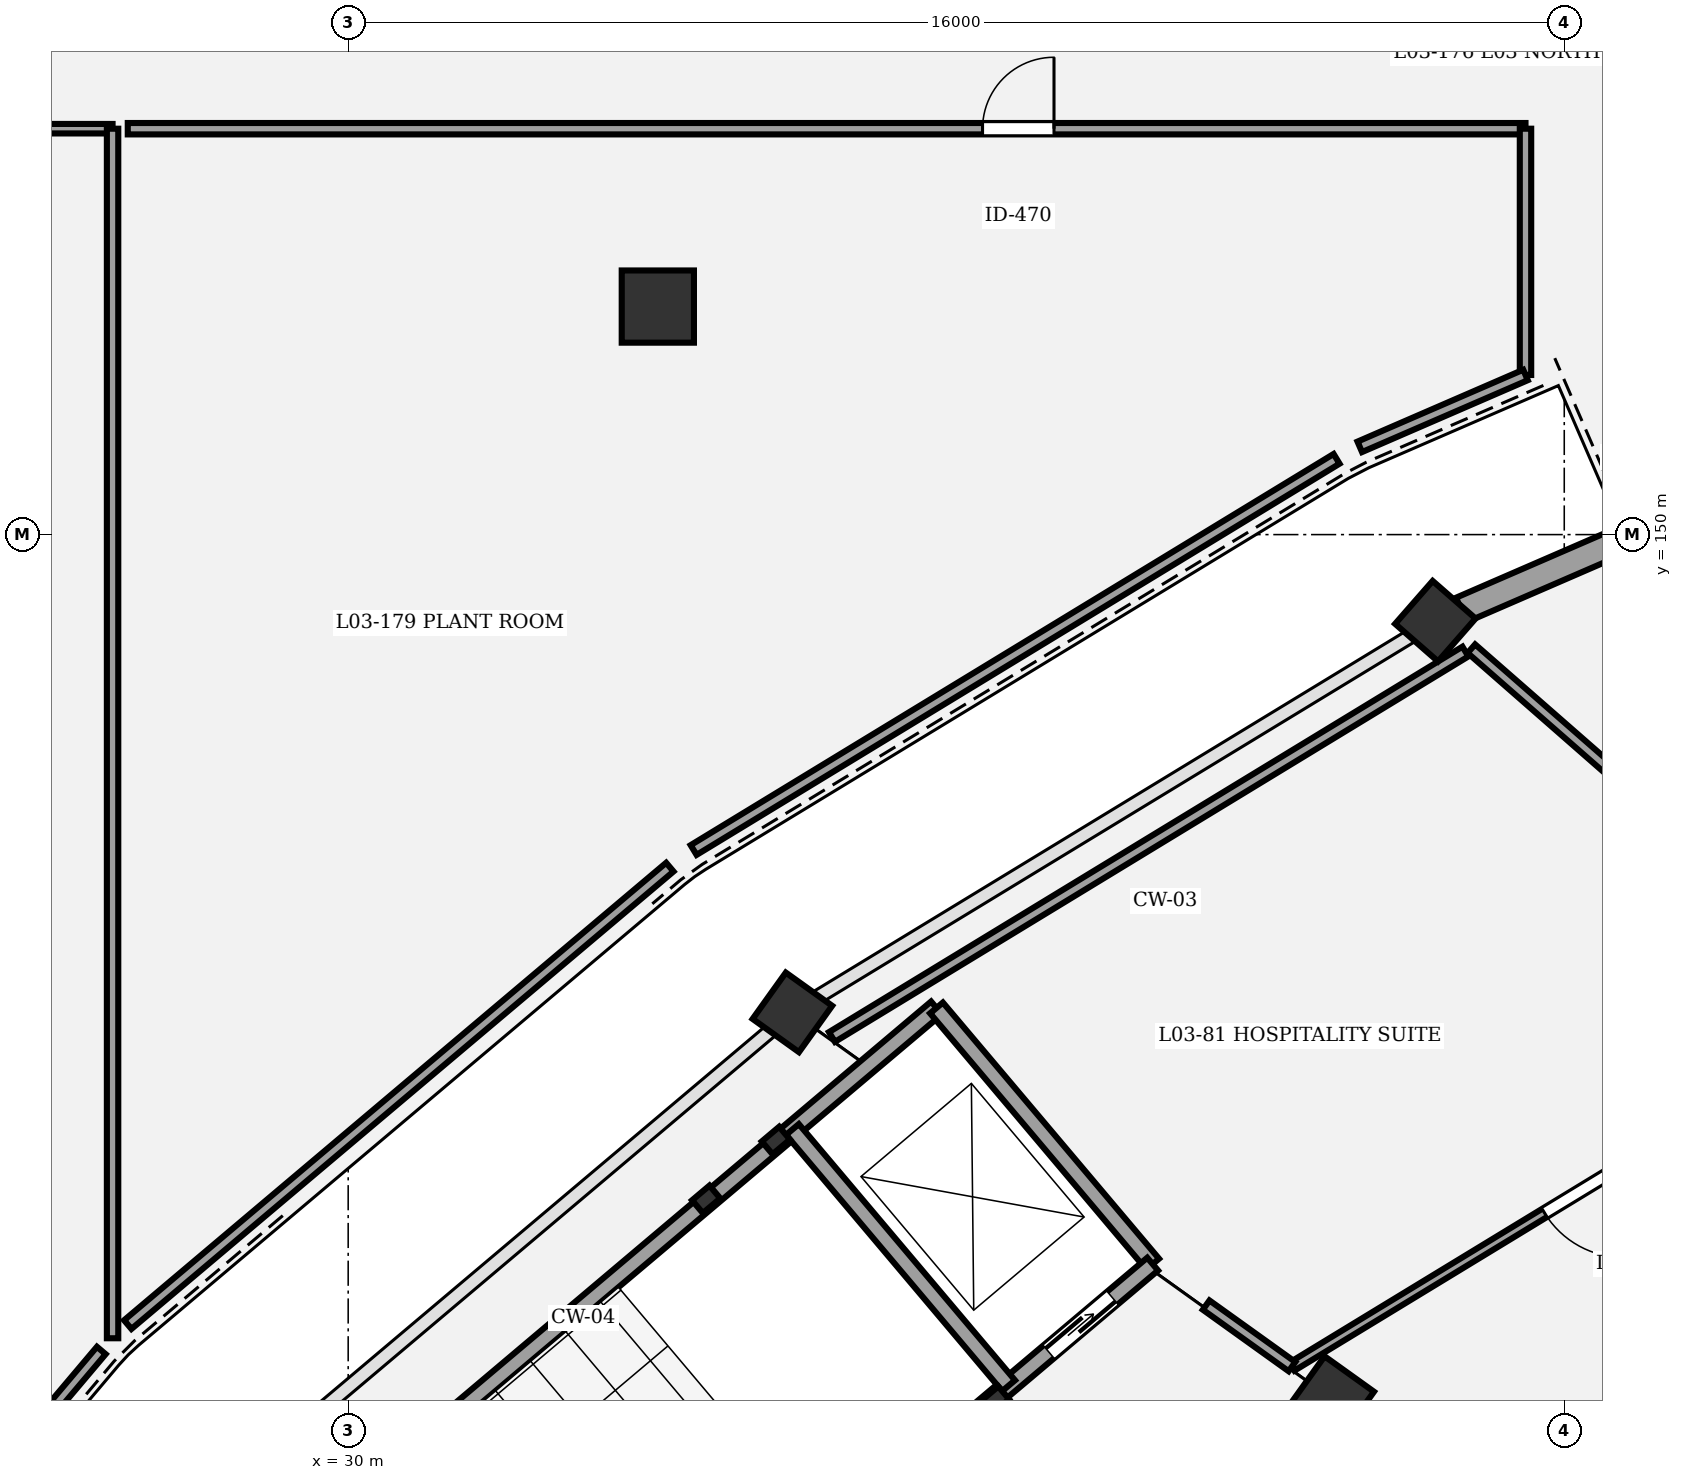
"""IFC4 building model, lengths in metres.
Left out: names, types, materials, properties, quantities, classifications, styles, units other than length and angle.
Written with IfcOpenShell. Run it as: python <this file> out.ifc"""

import sys

from ifc_helpers import new_model, si_unit, direction, frame, frame_2d, origin, origin_2d, place, context, subcontext, project, spatial, rectangle, circle, extrude, element, fill, save


model = new_model("IFC4")
c1 = context("Model", 3, precision=1e-05, world=origin(), true_north=direction((0.0, 1.0)))
c2 = subcontext(c1, "Body", "Model", "MODEL_VIEW")
j1 = project(units=[si_unit("LENGTHUNIT", "METRE"), si_unit("PLANEANGLEUNIT", "RADIAN")], contexts=[c1])
p1 = place(None, origin())
s1 = spatial("IfcSite", under=j1, at=p1, CompositionType="ELEMENT")
p2 = place(p1, origin())
s2 = spatial("IfcBuilding", under=s1, at=p2, CompositionType="ELEMENT")
p3 = place(p2, frame((0.0, 0.0, 14.7)))
s3 = spatial("IfcBuildingStorey", under=s2, at=p3, CompositionType="ELEMENT", Elevation=14.7)
p4 = place(p3, frame((44.304, 148.861, 0.0), z_axis=(0.0, 0.0, 1.0), x_axis=(-0.752529860433, 0.658558128912, 0.0)))
e1 = element("IfcColumn", 1, at=p4, inside=s3, PredefinedType="COLUMN", context=c2, shape_type="SweptSolid", body=[
    extrude(rectangle(XDim=0.75, YDim=0.75, at=origin_2d()), origin(), (0.0, 0.0, 1.0), 4.5),
])
p5 = place(p3, frame((42.939, 138.632, 0.0), z_axis=(0.0, 0.0, 1.0), x_axis=(-0.812897512265, 0.582406760395, 0.0)))
e2 = element("IfcColumn", 2, at=p5, inside=s3, PredefinedType="COLUMN", context=c2, shape_type="SweptSolid", body=[
    extrude(rectangle(XDim=0.8, YDim=0.8, at=origin_2d()), origin(), (0.0, 0.0, 1.0), 4.5),
])
p6 = place(p3, frame((35.844, 143.715, 0.0), z_axis=(0.0, 0.0, 1.0), x_axis=(-0.812897512265, 0.582406760395, 0.0)))
e3 = element("IfcColumn", 3, at=p6, inside=s3, PredefinedType="COLUMN", context=c2, shape_type="SweptSolid", body=[
    extrude(rectangle(XDim=0.75, YDim=0.75, at=origin_2d()), origin(), (0.0, 0.0, 1.0), 4.5),
])
p7 = place(p3, frame((34.074, 153.0, 0.0), z_axis=(0.0, 0.0, 1.0), x_axis=(1.0, 0.0, 0.0)))
e4 = element("IfcColumn", 4, at=p7, inside=s3, PredefinedType="COLUMN", context=c2, shape_type="SweptSolid", body=[
    extrude(circle(Radius=0.475, at=origin_2d()), origin(), (0.0, 0.0, 1.0), 4.5),
])
p8 = place(p3, frame((44.646, 149.009, 0.0), z_axis=(0.0, 0.0, 1.0), x_axis=(0.917502782842, 0.397729359587, 0.0)))
e5 = element("IfcWall", 5, at=p8, inside=s3, PredefinedType="STANDARD", context=c2, shape_type="SweptSolid", body=[
    extrude(rectangle(XDim=9.89, YDim=0.35, at=frame_2d((4.945, 0.0))), origin(), (0.0, 0.0, 1.0), 3.42),
])
p9 = place(p8, frame((4.045, 0.0, 0.0)))
e6 = element("IfcOpeningElement", 6, at=p9, cuts=e5, PredefinedType="OPENING", context=c2, shape_type="SweptSolid", body=[
    extrude(rectangle(XDim=1.8, YDim=2.4, at=frame_2d((0.9, 1.2))), frame((0.0, 0.185, 0.0), z_axis=(0.0, -1.0, 0.0), x_axis=(1.0, 0.0, 0.0)), (0.0, 0.0, 1.0), 0.37),
])
for number, where, z_axis, x_axis in (
    (7, (38.51, 138.613, 0.0), (0.0, 0.0, 1.0), (0.764, 0.645, 0.0)),
    (8, (35.627, 142.029, 0.0), (0.0, 0.0, 1.0), (0.764, 0.645, 0.0)),
    (9, (34.71, 141.255, 0.0), (0.0, 0.0, 1.0), (0.764, 0.645, 0.0)),
):
    element("IfcColumn", number, at=place(p3, frame(where, z_axis=z_axis, x_axis=x_axis)), inside=s3, PredefinedType="COLUMN", context=c2, shape_type="SweptSolid", body=[
        extrude(rectangle(XDim=0.3, YDim=0.22, at=origin_2d()), origin(), (0.0, 0.0, 1.0), 4.5),
    ])
p10 = place(p3, frame((29.319, 136.666, 0.0), z_axis=(0.0, 0.0, 1.0), x_axis=(0.764247804305, 0.644922703598, 0.0)))
e10 = element("IfcWall", 10, at=p10, inside=s3, PredefinedType="SHEAR", context=c2, shape_type="SweptSolid", body=[
    extrude(rectangle(XDim=11.02, YDim=0.22, at=frame_2d((5.51, 0.0))), origin(), (0.0, 0.0, 1.0), 4.25),
])
p11 = place(p3, frame((40.585, 140.403, 0.0), z_axis=(0.0, 0.0, 1.0), x_axis=(-0.644936622785, 0.764236058159, 0.0)))
e11 = element("IfcWall", 11, at=p11, inside=s3, PredefinedType="SHEAR", context=c2, shape_type="SweptSolid", body=[
    extrude(rectangle(XDim=4.41, YDim=0.22, at=frame_2d((2.205, 0.0))), origin(), (0.0, 0.0, 1.0), 4.25),
])
p12 = place(p3, frame((32.163, 133.296, 0.0), z_axis=(0.0, 0.0, 1.0), x_axis=(0.764257018762, 0.644911784102, 0.0)))
e12 = element("IfcWall", 12, at=p12, inside=s3, PredefinedType="SHEAR", context=c2, shape_type="SweptSolid", body=[
    extrude(rectangle(XDim=11.02, YDim=0.22, at=frame_2d((5.51, 0.0))), origin(), (0.0, 0.0, 1.0), 4.25),
])
p13 = place(p12, frame((0.3, 0.0, 0.0)))
e13 = element("IfcOpeningElement", 13, at=p13, cuts=e12, PredefinedType="OPENING", context=c2, shape_type="SweptSolid", body=[
    extrude(rectangle(XDim=1.15, YDim=2.15, at=frame_2d((0.575, 1.075))), frame((0.0, 0.12, 0.0), z_axis=(0.0, -1.0, 0.0), x_axis=(1.0, 0.0, 0.0)), (0.0, 0.0, 1.0), 0.24),
])
p14 = place(p12, frame((9.23, 0.0, 0.0)))
e14 = element("IfcOpeningElement", 14, at=p14, cuts=e12, PredefinedType="OPENING", context=c2, shape_type="SweptSolid", body=[
    extrude(rectangle(XDim=1.1, YDim=2.15, at=frame_2d((0.55, 1.075))), frame((0.0, 0.12, 0.0), z_axis=(0.0, -1.0, 0.0), x_axis=(1.0, 0.0, 0.0)), (0.0, 0.0, 1.0), 0.24),
])
p15 = place(p3, frame((38.689, 138.803, 0.0), z_axis=(0.0, 0.0, 1.0), x_axis=(-0.644904288042, 0.764263344185, 0.0)))
e15 = element("IfcWall", 15, at=p15, inside=s3, PredefinedType="SHEAR", context=c2, shape_type="SweptSolid", body=[
    extrude(rectangle(XDim=4.41, YDim=0.22, at=frame_2d((2.205, 0.0))), origin(), (0.0, 0.0, 1.0), 4.25),
])
p16 = place(p3, frame((50.105, 143.731, 0.0), z_axis=(0.0, 0.0, 1.0), x_axis=(-0.854321649351, -0.519744667554, 0.0)))
e16 = element("IfcWall", 16, at=p16, inside=s3, PredefinedType="PARTITIONING", context=c2, shape_type="SweptSolid", body=[
    extrude(rectangle(XDim=8.999, YDim=0.125, at=frame_2d((4.499, 0.0))), origin(), (0.0, 0.0, 1.0), 3.25),
])
p17 = place(p16, frame((3.889, 0.0, 0.0)))
e17 = element("IfcOpeningElement", 17, at=p17, cuts=e16, PredefinedType="OPENING", context=c2, shape_type="SweptSolid", body=[
    extrude(rectangle(XDim=1.22, YDim=2.2, at=frame_2d((0.61, 1.1))), frame((0.0, 0.073, 0.0), z_axis=(0.0, -1.0, 0.0), x_axis=(1.0, 0.0, 0.0)), (0.0, 0.0, 1.0), 0.145),
])
p18 = place(p3, frame((13.469, 155.343, 0.0), z_axis=(0.0, 0.0, 1.0), x_axis=(0.99999997621, -0.00021812629, 0.0)))
e18 = element("IfcWall", 18, at=p18, inside=s3, PredefinedType="PARTITIONING", context=c2, shape_type="SweptSolid", body=[
    extrude(rectangle(XDim=13.431, YDim=0.125, at=frame_2d((6.716, 0.0))), origin(), (0.0, 0.0, 1.0), 3.25),
])
p19 = place(p18, frame((7.724, 0.0, 0.0)))
e19 = element("IfcOpeningElement", 19, at=p19, cuts=e18, PredefinedType="OPENING", context=c2, shape_type="SweptSolid", body=[
    extrude(rectangle(XDim=1.4, YDim=2.3, at=frame_2d((0.7, 1.15))), frame((0.0, 0.073, 0.0), z_axis=(0.0, -1.0, 0.0), x_axis=(1.0, 0.0, 0.0)), (0.0, 0.0, 1.0), 0.145),
])
p20 = place(p3, frame((27.1, 155.34, 0.0), z_axis=(0.0, 0.0, 1.0), x_axis=(1.0, 0.0, 0.0)))
e20 = element("IfcWall", 20, at=p20, inside=s3, PredefinedType="PARTITIONING", context=c2, shape_type="SweptSolid", body=[
    extrude(rectangle(XDim=18.39, YDim=0.15, at=frame_2d((9.195, 0.0))), origin(), (0.0, 0.0, 1.0), 3.25),
])
p21 = place(p20, frame((11.247, 0.0, 0.0)))
e21 = element("IfcOpeningElement", 21, at=p21, cuts=e20, PredefinedType="OPENING", context=c2, shape_type="SweptSolid", body=[
    extrude(rectangle(XDim=0.94, YDim=2.1, at=frame_2d((0.47, 1.05))), frame((0.0, 0.085, 0.0), z_axis=(0.0, -1.0, 0.0), x_axis=(1.0, 0.0, 0.0)), (0.0, 0.0, 1.0), 0.17),
])
p22 = place(p3, frame((50.18, 143.772, 0.0), z_axis=(0.0, 0.0, 1.0), x_axis=(-0.752576694707, 0.658504607869, 0.0)))
e22 = element("IfcWall", 22, at=p22, inside=s3, PredefinedType="PARTITIONING", context=c2, shape_type="SweptSolid", body=[
    extrude(rectangle(XDim=7.178, YDim=0.15, at=frame_2d((3.589, 0.0))), origin(), (0.0, 0.0, 1.0), 3.25),
])
p23 = place(p3, frame((36.365, 143.391, 0.0), z_axis=(0.0, 0.0, 1.0), x_axis=(0.854323689683, 0.519741313777, 0.0)))
e23 = element("IfcWall", 23, at=p23, inside=s3, PredefinedType="PARTITIONING", context=c2, shape_type="SweptSolid", body=[
    extrude(rectangle(XDim=9.756, YDim=0.15, at=frame_2d((4.878, 0.0))), origin(), (0.0, 0.0, 1.0), 3.25),
])
p24 = place(p3, frame((42.418, 139.054, 0.0), z_axis=(0.0, 0.0, 1.0), x_axis=(-0.812925279681, 0.582368001916, 0.0)))
e24 = element("IfcWall", 24, at=p24, inside=s3, PredefinedType="PARTITIONING", context=c2, shape_type="SweptSolid", body=[
    extrude(rectangle(XDim=1.389, YDim=0.15, at=frame_2d((0.695, 0.0))), origin(), (0.0, 0.0, 1.0), 3.25),
])
p25 = place(p3, frame((26.9, 155.34, 0.0), z_axis=(0.0, 0.0, 1.0), x_axis=(0.0, -1.0, 0.0)))
e25 = element("IfcWall", 25, at=p25, inside=s3, PredefinedType="PARTITIONING", context=c2, shape_type="SweptSolid", body=[
    extrude(rectangle(XDim=15.913, YDim=0.15, at=frame_2d((7.957, 0.0))), origin(), (0.0, 0.0, 1.0), 3.25),
])
p26 = place(p3, frame((26.752, 139.266, 0.0), z_axis=(0.0, 0.0, 1.0), x_axis=(-0.645180125691, -0.764030500316, 0.0)))
e26 = element("IfcWall", 26, at=p26, inside=s3, PredefinedType="PARTITIONING", context=c2, shape_type="SweptSolid", body=[
    extrude(rectangle(XDim=9.151, YDim=0.15, at=frame_2d((4.576, 0.0))), origin(), (0.0, 0.0, 1.0), 3.25),
])
p27 = place(p3, frame((45.49, 155.34, 0.0), z_axis=(0.0, 0.0, 1.0), x_axis=(0.0, -1.0, 0.0)))
e27 = element("IfcWall", 27, at=p27, inside=s3, PredefinedType="PARTITIONING", context=c2, shape_type="SweptSolid", body=[
    extrude(rectangle(XDim=3.24, YDim=0.15, at=frame_2d((1.62, 0.0))), origin(), (0.0, 0.0, 1.0), 3.25),
])
p28 = place(p3, frame((45.49, 152.1, 0.0), z_axis=(0.0, 0.0, 1.0), x_axis=(-0.917484400903, -0.397771761314, 0.0)))
e28 = element("IfcWall", 28, at=p28, inside=s3, PredefinedType="PARTITIONING", context=c2, shape_type="SweptSolid", body=[
    extrude(rectangle(XDim=2.376, YDim=0.15, at=frame_2d((1.188, 0.0))), origin(), (0.0, 0.0, 1.0), 3.25),
])
p29 = place(p3, frame((43.004, 150.997, 0.0), z_axis=(0.0, 0.0, 1.0), x_axis=(-0.854333268174, -0.519725568826, 0.0)))
e29 = element("IfcWall", 29, at=p29, inside=s3, PredefinedType="PARTITIONING", context=c2, shape_type="SweptSolid", body=[
    extrude(rectangle(XDim=9.902, YDim=0.15, at=frame_2d((4.951, 0.0))), origin(), (0.0, 0.0, 1.0), 3.25),
])
p30 = place(p3, frame((34.232, 145.625, 0.0), z_axis=(0.0, 0.0, 1.0), x_axis=(-0.764245949545, -0.644924901523, 0.0)))
e30 = element("IfcWall", 30, at=p30, inside=s3, PredefinedType="PARTITIONING", context=c2, shape_type="SweptSolid", body=[
    extrude(rectangle(XDim=9.332, YDim=0.15, at=frame_2d((4.666, 0.0))), origin(), (0.0, 0.0, 1.0), 3.25),
])
p31 = place(p14, origin())
e31 = element("IfcDoor", 31, at=p31, inside=s3, OperationType="DOUBLE_DOOR_SLIDING", PredefinedType="DOOR", context=c2, shape_type="SweptSolid", body=[
    extrude(rectangle(XDim=1.1, YDim=2.15, at=frame_2d((0.55, 1.075))), frame((0.0, 0.025, 0.0), z_axis=(0.0, -1.0, 0.0), x_axis=(1.0, 0.0, 0.0)), (0.0, 0.0, 1.0), 0.05),
])
fill(e14, e31)
p32 = place(p17, origin())
e32 = element("IfcDoor", 32, at=p32, inside=s3, OperationType="SINGLE_SWING_LEFT", PredefinedType="DOOR", context=c2, shape_type="SweptSolid", body=[
    extrude(rectangle(XDim=1.22, YDim=2.2, at=frame_2d((0.61, 1.1))), frame((0.0, 0.025, 0.0), z_axis=(0.0, -1.0, 0.0), x_axis=(1.0, 0.0, 0.0)), (0.0, 0.0, 1.0), 0.05),
])
fill(e17, e32)
p33 = place(p21, origin())
e33 = element("IfcDoor", 33, at=p33, inside=s3, OperationType="SINGLE_SWING_RIGHT", PredefinedType="DOOR", context=c2, shape_type="SweptSolid", body=[
    extrude(rectangle(XDim=0.94, YDim=2.1, at=frame_2d((0.47, 1.05))), frame((0.0, 0.025, 0.0), z_axis=(0.0, -1.0, 0.0), x_axis=(1.0, 0.0, 0.0)), (0.0, 0.0, 1.0), 0.05),
])
fill(e21, e33)
save(model, sys.argv[1])
